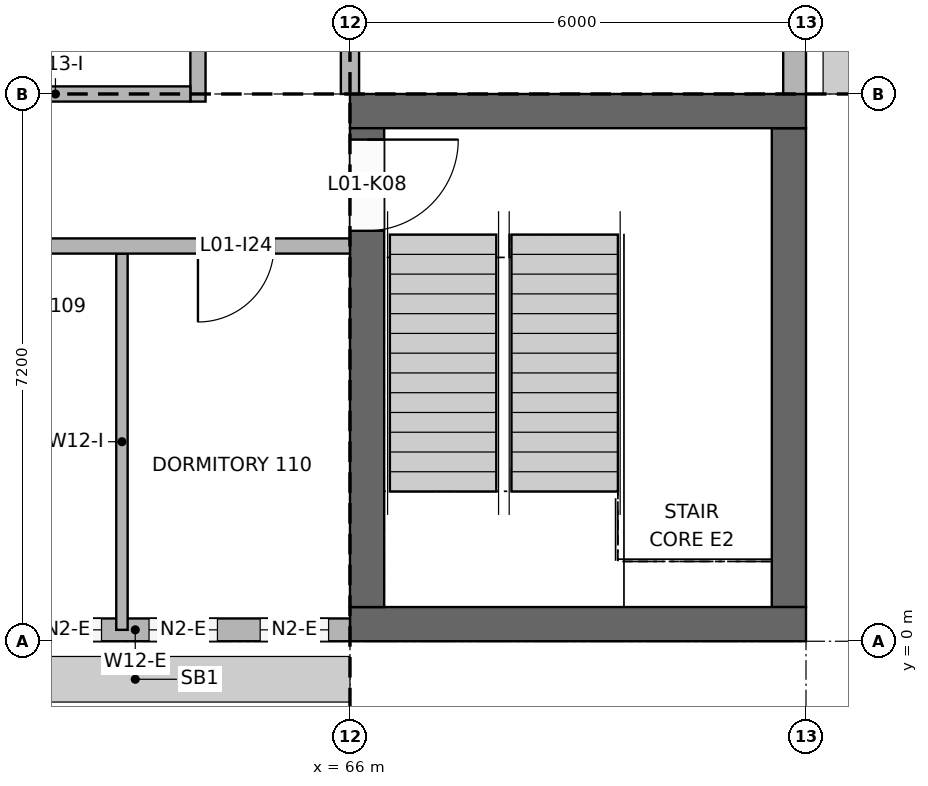
"""IFC4 building model, lengths in metres.
Left out: names, types, materials, properties, quantities, classifications, styles, units other than length and angle.
Written with IfcOpenShell. Run it as: python <this file> out.ifc"""

import sys

from ifc_helpers import new_model, si_unit, direction, frame, frame_2d, origin, place, context, subcontext, project, spatial, rectangle, extrude, element, fill, save


model = new_model("IFC4")
c1 = context("Model", 3, precision=1e-05, world=origin(), true_north=direction((0.0, 1.0)))
c2 = subcontext(c1, "Body", "Model", "MODEL_VIEW")
j1 = project(units=[si_unit("LENGTHUNIT", "METRE"), si_unit("PLANEANGLEUNIT", "RADIAN")], contexts=[c1])
p1 = place(None, origin())
s1 = spatial("IfcSite", under=j1, at=p1, CompositionType="ELEMENT")
p2 = place(p1, origin())
s2 = spatial("IfcBuilding", under=s1, at=p2, CompositionType="ELEMENT")
p3 = place(p2, frame((0.0, 0.0, 4.2)))
s3 = spatial("IfcBuildingStorey", under=s2, at=p3, CompositionType="ELEMENT", Elevation=4.2)
for number, where, z_axis, x_axis in (
    (1, (66.0, 0.225, 0.0), (0.0, 0.0, 1.0), (1.0, 0.0, 0.0)),
    (2, (66.0, 6.975, 0.0), (0.0, 0.0, 1.0), (1.0, 0.0, 0.0)),
):
    element("IfcWall", number, at=place(p3, frame(where, z_axis=z_axis, x_axis=x_axis)), inside=s3, PredefinedType="SHEAR", context=c2, shape_type="SweptSolid", body=[
        extrude(rectangle(XDim=6.0, YDim=0.45, at=frame_2d((3.0, 0.0))), origin(), (0.0, 0.0, 1.0), 3.95),
    ])
p4 = place(p3, frame((66.225, 0.45, 0.0), z_axis=(0.0, 0.0, 1.0), x_axis=(0.0, 1.0, 0.0)))
e3 = element("IfcWall", 3, at=p4, inside=s3, PredefinedType="SHEAR", context=c2, shape_type="SweptSolid", body=[
    extrude(rectangle(XDim=6.3, YDim=0.45, at=frame_2d((3.15, 0.0))), origin(), (0.0, 0.0, 1.0), 3.95),
])
p5 = place(p4, frame((4.95, 0.0, 0.0)))
e4 = element("IfcOpeningElement", 4, at=p5, cuts=e3, PredefinedType="OPENING", context=c2, shape_type="SweptSolid", body=[
    extrude(rectangle(XDim=1.2, YDim=2.1, at=frame_2d((0.6, 1.05))), frame((0.0, 0.235, 0.0), z_axis=(0.0, -1.0, 0.0), x_axis=(1.0, 0.0, 0.0)), (0.0, 0.0, 1.0), 0.47),
])
p6 = place(p3, frame((71.775, 0.45, 0.0), z_axis=(0.0, 0.0, 1.0), x_axis=(0.0, 1.0, 0.0)))
e5 = element("IfcWall", 5, at=p6, inside=s3, PredefinedType="SHEAR", context=c2, shape_type="SweptSolid", body=[
    extrude(rectangle(XDim=6.3, YDim=0.45, at=frame_2d((3.15, 0.0))), origin(), (0.0, 0.0, 1.0), 3.95),
])
p7 = place(p3, frame((60.35, 0.15, 0.0), z_axis=(0.0, 0.0, 1.0), x_axis=(1.0, 0.0, 0.0)))
e6 = element("IfcWall", 6, at=p7, inside=s3, PredefinedType="SOLIDWALL", context=c2, shape_type="SweptSolid", body=[
    extrude(rectangle(XDim=5.65, YDim=0.3, at=frame_2d((2.825, 0.0))), origin(), (0.0, 0.0, 1.0), 3.15),
])
p8 = place(p7, frame((0.194, 0.0, 0.9)))
e7 = element("IfcOpeningElement", 7, at=p8, cuts=e6, PredefinedType="OPENING", context=c2, shape_type="SweptSolid", body=[
    extrude(rectangle(XDim=0.9, YDim=1.2, at=frame_2d((0.45, 0.6))), frame((0.0, 0.16, 0.0), z_axis=(0.0, -1.0, 0.0), x_axis=(1.0, 0.0, 0.0)), (0.0, 0.0, 1.0), 0.32),
])
p9 = place(p7, frame((1.481, 0.0, 0.9)))
e8 = element("IfcOpeningElement", 8, at=p9, cuts=e6, PredefinedType="OPENING", context=c2, shape_type="SweptSolid", body=[
    extrude(rectangle(XDim=0.9, YDim=1.2, at=frame_2d((0.45, 0.6))), frame((0.0, 0.16, 0.0), z_axis=(0.0, -1.0, 0.0), x_axis=(1.0, 0.0, 0.0)), (0.0, 0.0, 1.0), 0.32),
])
p10 = place(p7, frame((3.006, 0.0, 0.9)))
e9 = element("IfcOpeningElement", 9, at=p10, cuts=e6, PredefinedType="OPENING", context=c2, shape_type="SweptSolid", body=[
    extrude(rectangle(XDim=0.9, YDim=1.2, at=frame_2d((0.45, 0.6))), frame((0.0, 0.16, 0.0), z_axis=(0.0, -1.0, 0.0), x_axis=(1.0, 0.0, 0.0)), (0.0, 0.0, 1.0), 0.32),
])
p11 = place(p7, frame((4.469, 0.0, 0.9)))
e10 = element("IfcOpeningElement", 10, at=p11, cuts=e6, PredefinedType="OPENING", context=c2, shape_type="SweptSolid", body=[
    extrude(rectangle(XDim=0.9, YDim=1.2, at=frame_2d((0.45, 0.6))), frame((0.0, 0.16, 0.0), z_axis=(0.0, -1.0, 0.0), x_axis=(1.0, 0.0, 0.0)), (0.0, 0.0, 1.0), 0.32),
])
p12 = place(p3, frame((71.85, 7.2, 0.0), z_axis=(0.0, 0.0, 1.0), x_axis=(0.0, 1.0, 0.0)))
e11 = element("IfcWall", 11, at=p12, inside=s3, PredefinedType="SOLIDWALL", context=c2, shape_type="SweptSolid", body=[
    extrude(rectangle(XDim=6.85, YDim=0.3, at=frame_2d((3.425, 0.0))), origin(), (0.0, 0.0, 1.0), 3.05),
])
p13 = place(p12, frame((5.635, 0.0, 0.9)))
e12 = element("IfcOpeningElement", 12, at=p13, cuts=e11, PredefinedType="OPENING", context=c2, shape_type="SweptSolid", body=[
    extrude(rectangle(XDim=0.9, YDim=1.2, at=frame_2d((0.45, 0.6))), frame((0.0, 0.16, 0.0), z_axis=(0.0, -1.0, 0.0), x_axis=(1.0, 0.0, 0.0)), (0.0, 0.0, 1.0), 0.32),
])
p14 = place(p3, frame((63.0, 0.15, 0.0), z_axis=(0.0, 0.0, 1.0), x_axis=(0.0, 1.0, 0.0)))
e13 = element("IfcWall", 13, at=p14, inside=s3, PredefinedType="PARTITIONING", context=c2, shape_type="SweptSolid", body=[
    extrude(rectangle(XDim=4.95, YDim=0.15, at=frame_2d((2.475, 0.0))), origin(), (0.0, 0.0, 1.0), 3.15),
])
p15 = place(p3, frame((64.0, 7.1, 0.0), z_axis=(0.0, 0.0, 1.0), x_axis=(0.0, 1.0, 0.0)))
e14 = element("IfcWall", 14, at=p15, inside=s3, PredefinedType="PARTITIONING", context=c2, shape_type="SweptSolid", body=[
    extrude(rectangle(XDim=5.4, YDim=0.2, at=frame_2d((2.7, 0.0))), origin(), (0.0, 0.0, 1.0), 3.15),
])
p16 = place(p15, frame((2.2, 0.0, 0.0)))
e15 = element("IfcOpeningElement", 15, at=p16, cuts=e14, PredefinedType="OPENING", context=c2, shape_type="SweptSolid", body=[
    extrude(rectangle(XDim=1.0, YDim=2.1, at=frame_2d((0.5, 1.05))), frame((0.0, 0.11, 0.0), z_axis=(0.0, -1.0, 0.0), x_axis=(1.0, 0.0, 0.0)), (0.0, 0.0, 1.0), 0.22),
])
p17 = place(p3, frame((66.0, 7.2, 0.0), z_axis=(0.0, 0.0, 1.0), x_axis=(0.0, 1.0, 0.0)))
e16 = element("IfcWall", 16, at=p17, inside=s3, PredefinedType="PARTITIONING", context=c2, shape_type="SweptSolid", body=[
    extrude(rectangle(XDim=5.32, YDim=0.24, at=frame_2d((2.66, 0.0))), origin(), (0.0, 0.0, 1.0), 3.05),
])
p18 = place(p3, frame((54.15, 5.2, 0.0), z_axis=(0.0, 0.0, 1.0), x_axis=(1.0, 0.0, 0.0)))
e17 = element("IfcWall", 17, at=p18, inside=s3, PredefinedType="PARTITIONING", context=c2, shape_type="SweptSolid", body=[
    extrude(rectangle(XDim=11.85, YDim=0.2, at=frame_2d((5.925, 0.0))), origin(), (0.0, 0.0, 1.0), 3.05),
])
p19 = place(p18, frame((0.925, 0.0, 0.0)))
e18 = element("IfcOpeningElement", 18, at=p19, cuts=e17, PredefinedType="OPENING", context=c2, shape_type="SweptSolid", body=[
    extrude(rectangle(XDim=1.0, YDim=2.1, at=frame_2d((0.5, 1.05))), frame((0.0, 0.11, 0.0), z_axis=(0.0, -1.0, 0.0), x_axis=(1.0, 0.0, 0.0)), (0.0, 0.0, 1.0), 0.22),
])
p20 = place(p18, frame((3.85, 0.0, 0.0)))
e19 = element("IfcOpeningElement", 19, at=p20, cuts=e17, PredefinedType="OPENING", context=c2, shape_type="SweptSolid", body=[
    extrude(rectangle(XDim=1.0, YDim=2.1, at=frame_2d((0.5, 1.05))), frame((0.0, 0.11, 0.0), z_axis=(0.0, -1.0, 0.0), x_axis=(1.0, 0.0, 0.0)), (0.0, 0.0, 1.0), 0.22),
])
p21 = place(p18, frame((6.85, 0.0, 0.0)))
e20 = element("IfcOpeningElement", 20, at=p21, cuts=e17, PredefinedType="OPENING", context=c2, shape_type="SweptSolid", body=[
    extrude(rectangle(XDim=1.0, YDim=2.1, at=frame_2d((0.5, 1.05))), frame((0.0, 0.11, 0.0), z_axis=(0.0, -1.0, 0.0), x_axis=(1.0, 0.0, 0.0)), (0.0, 0.0, 1.0), 0.22),
])
p22 = place(p18, frame((9.85, 0.0, 0.0)))
e21 = element("IfcOpeningElement", 21, at=p22, cuts=e17, PredefinedType="OPENING", context=c2, shape_type="SweptSolid", body=[
    extrude(rectangle(XDim=1.0, YDim=2.1, at=frame_2d((0.5, 1.05))), frame((0.0, 0.11, 0.0), z_axis=(0.0, -1.0, 0.0), x_axis=(1.0, 0.0, 0.0)), (0.0, 0.0, 1.0), 0.22),
])
p23 = place(p3, frame((60.35, 7.2, 0.0), z_axis=(0.0, 0.0, 1.0), x_axis=(1.0, 0.0, 0.0)))
e22 = element("IfcWall", 22, at=p23, inside=s3, PredefinedType="PARTITIONING", context=c2, shape_type="SweptSolid", body=[
    extrude(rectangle(XDim=3.55, YDim=0.2, at=frame_2d((1.775, 0.0))), origin(), (0.0, 0.0, 1.0), 3.15),
])
p24 = place(p9, origin())
e23 = element("IfcWindow", 23, at=p24, inside=s3, PartitioningType="SINGLE_PANEL", PredefinedType="WINDOW", context=c2, shape_type="SweptSolid", body=[
    extrude(rectangle(XDim=0.9, YDim=1.2, at=frame_2d((0.45, 0.6))), frame((0.0, 0.03, 0.0), z_axis=(0.0, -1.0, 0.0), x_axis=(1.0, 0.0, 0.0)), (0.0, 0.0, 1.0), 0.06),
])
fill(e8, e23)
p25 = place(p10, origin())
e24 = element("IfcWindow", 24, at=p25, inside=s3, PartitioningType="SINGLE_PANEL", PredefinedType="WINDOW", context=c2, shape_type="SweptSolid", body=[
    extrude(rectangle(XDim=0.9, YDim=1.2, at=frame_2d((0.45, 0.6))), frame((0.0, 0.03, 0.0), z_axis=(0.0, -1.0, 0.0), x_axis=(1.0, 0.0, 0.0)), (0.0, 0.0, 1.0), 0.06),
])
fill(e9, e24)
p26 = place(p11, origin())
e25 = element("IfcWindow", 25, at=p26, inside=s3, PartitioningType="SINGLE_PANEL", PredefinedType="WINDOW", context=c2, shape_type="SweptSolid", body=[
    extrude(rectangle(XDim=0.9, YDim=1.2, at=frame_2d((0.45, 0.6))), frame((0.0, 0.03, 0.0), z_axis=(0.0, -1.0, 0.0), x_axis=(1.0, 0.0, 0.0)), (0.0, 0.0, 1.0), 0.06),
])
fill(e10, e25)
p27 = place(p5, frame((1.2, 0.0, 0.0), z_axis=(0.0, 0.0, 1.0), x_axis=(-1.0, 0.0, 0.0)))
e26 = element("IfcDoor", 26, at=p27, inside=s3, OperationType="SINGLE_SWING_LEFT", PredefinedType="DOOR", context=c2, shape_type="SweptSolid", body=[
    extrude(rectangle(XDim=1.2, YDim=2.1, at=frame_2d((0.6, 1.05))), frame((0.0, 0.025, 0.0), z_axis=(0.0, -1.0, 0.0), x_axis=(1.0, 0.0, 0.0)), (0.0, 0.0, 1.0), 0.05),
])
fill(e4, e26)
p28 = place(p22, frame((1.0, 0.0, 0.0), z_axis=(0.0, 0.0, 1.0), x_axis=(-1.0, 0.0, 0.0)))
e27 = element("IfcDoor", 27, at=p28, inside=s3, OperationType="SINGLE_SWING_RIGHT", PredefinedType="DOOR", context=c2, shape_type="SweptSolid", body=[
    extrude(rectangle(XDim=1.0, YDim=2.1, at=frame_2d((0.5, 1.05))), frame((0.0, 0.025, 0.0), z_axis=(0.0, -1.0, 0.0), x_axis=(1.0, 0.0, 0.0)), (0.0, 0.0, 1.0), 0.05),
])
fill(e21, e27)
save(model, sys.argv[1])
